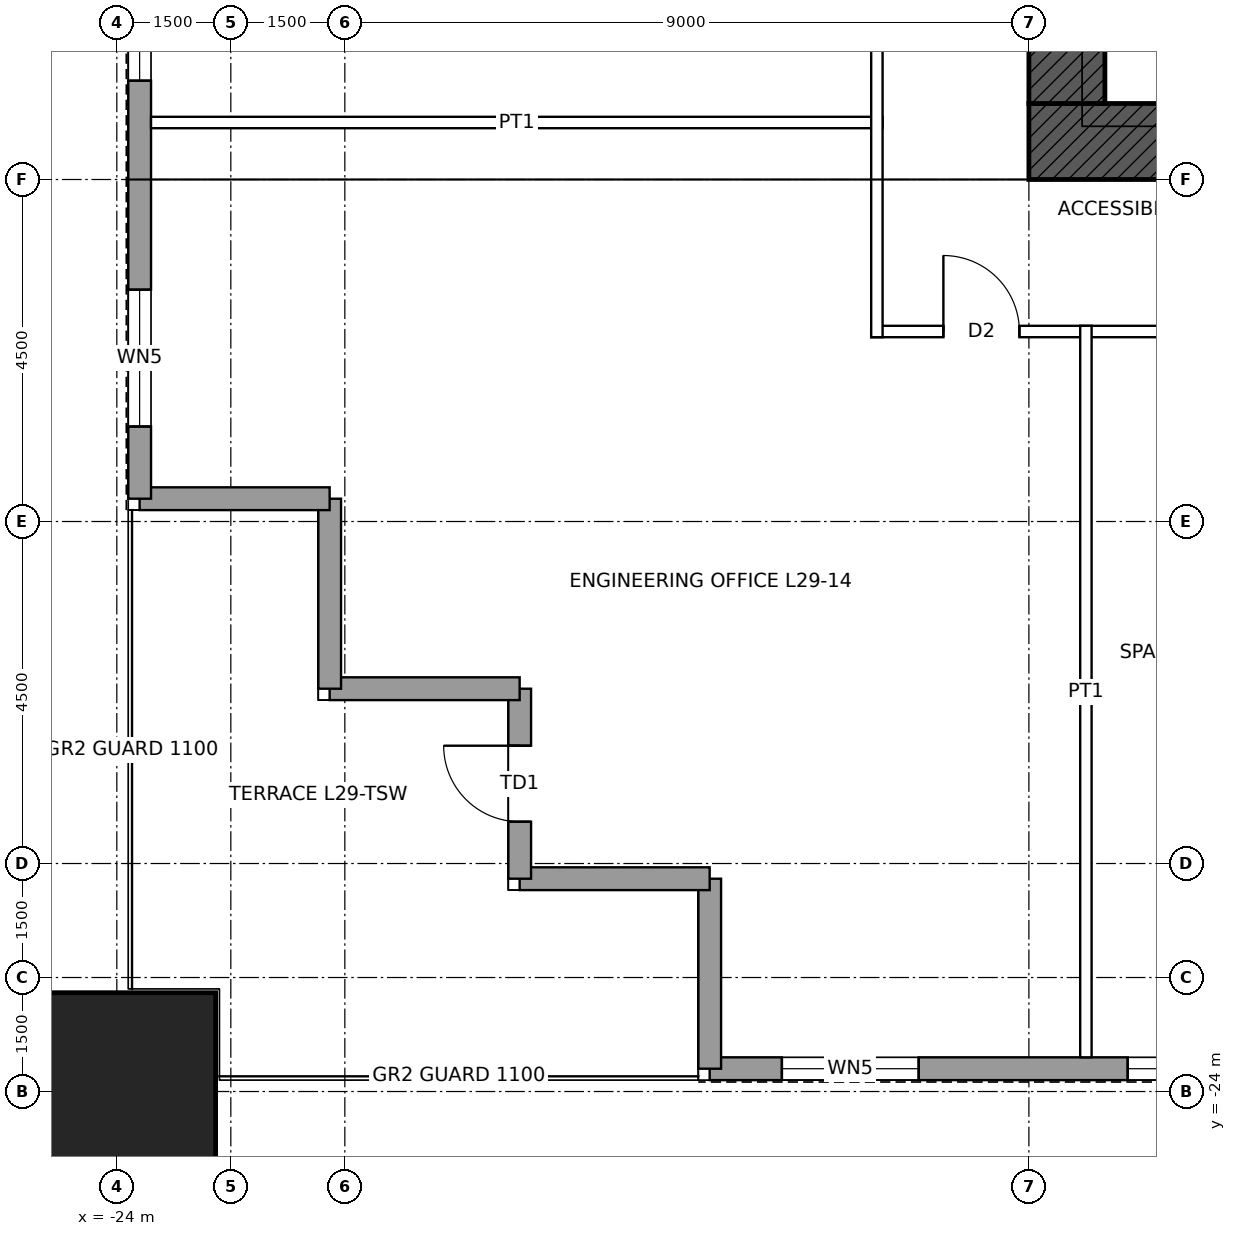
"""IFC4 building model, lengths in metres.
Left out: names, types, materials, properties, quantities, classifications, styles, units other than length and angle.
Written with IfcOpenShell. Run it as: python <this file> out.ifc"""

import sys

from ifc_helpers import new_model, si_unit, direction, frame, frame_2d, origin, origin_2d, place, context, subcontext, project, spatial, rectangle, hollow_rectangle, extrude, element, fill, save


model = new_model("IFC4")
c1 = context("Model", 3, precision=1e-05, world=origin(), true_north=direction((0.0, 1.0)))
c2 = subcontext(c1, "Body", "Model", "MODEL_VIEW")
j1 = project(units=[si_unit("LENGTHUNIT", "METRE"), si_unit("PLANEANGLEUNIT", "RADIAN")], contexts=[c1])
p1 = place(None, origin())
s1 = spatial("IfcSite", under=j1, at=p1, CompositionType="ELEMENT")
p2 = place(p1, origin())
s2 = spatial("IfcBuilding", under=s1, at=p2, CompositionType="ELEMENT")
p3 = place(p2, frame((0.0, 0.0, 144.9)))
s3 = spatial("IfcBuildingStorey", under=s2, at=p3, CompositionType="ELEMENT", Elevation=144.9)
p4 = place(p3, frame((-24.0, -24.0, 0.0), z_axis=(0.0, 0.0, 1.0), x_axis=(1.0, 0.0, 0.0)))
e1 = element("IfcColumn", 1, at=p4, inside=s3, PredefinedType="COLUMN", context=c2, shape_type="SweptSolid", body=[
    extrude(hollow_rectangle(XDim=2.6, YDim=2.6, WallThickness=0.13, at=origin_2d()), origin(), (0.0, 0.0, 1.0), 4.5),
])
p5 = place(p3, frame((12.0, -11.5, 0.0), z_axis=(0.0, 0.0, 1.0), x_axis=(-1.0, 0.0, 0.0)))
e2 = element("IfcWall", 2, at=p5, inside=s3, PredefinedType="SHEAR", context=c2, shape_type="SweptSolid", body=[
    extrude(rectangle(XDim=24.0, YDim=1.0, at=frame_2d((12.0, 0.0))), origin(), (0.0, 0.0, 1.0), 4.5),
])
p6 = place(p5, frame((11.5, 0.0, 0.0)))
e3 = element("IfcOpeningElement", 3, at=p6, cuts=e2, PredefinedType="OPENING", context=c2, shape_type="SweptSolid", body=[
    extrude(rectangle(XDim=1.0, YDim=2.1, at=frame_2d((0.5, 1.05))), frame((0.0, 0.51, 0.0), z_axis=(0.0, -1.0, 0.0), x_axis=(1.0, 0.0, 0.0)), (0.0, 0.0, 1.0), 1.02),
])
p7 = place(p5, frame((1.0, 0.0, 0.0)))
e4 = element("IfcOpeningElement", 4, at=p7, cuts=e2, PredefinedType="OPENING", context=c2, shape_type="SweptSolid", body=[
    extrude(rectangle(XDim=1.0, YDim=2.4, at=frame_2d((0.5, 1.2))), frame((0.0, 0.51, 0.0), z_axis=(0.0, -1.0, 0.0), x_axis=(1.0, 0.0, 0.0)), (0.0, 0.0, 1.0), 1.02),
])
p8 = place(p3, frame((-11.5, -11.0, 0.0), z_axis=(0.0, 0.0, 1.0), x_axis=(0.0, 1.0, 0.0)))
e5 = element("IfcWall", 5, at=p8, inside=s3, PredefinedType="SHEAR", context=c2, shape_type="SweptSolid", body=[
    extrude(rectangle(XDim=22.0, YDim=1.0, at=frame_2d((11.0, 0.0))), origin(), (0.0, 0.0, 1.0), 4.5),
])
p9 = place(p8, frame((10.5, 0.0, 0.0)))
e6 = element("IfcOpeningElement", 6, at=p9, cuts=e5, PredefinedType="OPENING", context=c2, shape_type="SweptSolid", body=[
    extrude(rectangle(XDim=1.0, YDim=2.4, at=frame_2d((0.5, 1.2))), frame((0.0, 0.51, 0.0), z_axis=(0.0, -1.0, 0.0), x_axis=(1.0, 0.0, 0.0)), (0.0, 0.0, 1.0), 1.02),
])
p10 = place(p3, frame((16.2, -23.7, 0.0), z_axis=(0.0, 0.0, 1.0), x_axis=(-1.0, 0.0, 0.0)))
e7 = element("IfcWall", 7, at=p10, inside=s3, PredefinedType="SOLIDWALL", context=c2, shape_type="SweptSolid", body=[
    extrude(rectangle(XDim=32.4, YDim=0.3, at=frame_2d((16.2, 0.0))), origin(), (0.0, 0.0, 1.0), 4.3),
])
p11 = place(p10, frame((0.95, 0.0, 1.0)))
e8 = element("IfcOpeningElement", 8, at=p11, cuts=e7, PredefinedType="OPENING", context=c2, shape_type="SweptSolid", body=[
    extrude(rectangle(XDim=1.8, YDim=1.2, at=frame_2d((0.9, 0.6))), frame((0.0, 0.16, 0.0), z_axis=(0.0, -1.0, 0.0), x_axis=(1.0, 0.0, 0.0)), (0.0, 0.0, 1.0), 0.32),
])
p12 = place(p10, frame((5.5, 0.0, 1.0)))
e9 = element("IfcOpeningElement", 9, at=p12, cuts=e7, PredefinedType="OPENING", context=c2, shape_type="SweptSolid", body=[
    extrude(rectangle(XDim=2.4, YDim=1.2, at=frame_2d((1.2, 0.6))), frame((0.0, 0.16, 0.0), z_axis=(0.0, -1.0, 0.0), x_axis=(1.0, 0.0, 0.0)), (0.0, 0.0, 1.0), 0.32),
])
p13 = place(p10, frame((9.5, 0.0, 1.0)))
e10 = element("IfcOpeningElement", 10, at=p13, cuts=e7, PredefinedType="OPENING", context=c2, shape_type="SweptSolid", body=[
    extrude(rectangle(XDim=2.4, YDim=1.2, at=frame_2d((1.2, 0.6))), frame((0.0, 0.16, 0.0), z_axis=(0.0, -1.0, 0.0), x_axis=(1.0, 0.0, 0.0)), (0.0, 0.0, 1.0), 0.32),
])
p14 = place(p10, frame((13.0, 0.0, 1.0)))
e11 = element("IfcOpeningElement", 11, at=p14, cuts=e7, PredefinedType="OPENING", context=c2, shape_type="SweptSolid", body=[
    extrude(rectangle(XDim=2.4, YDim=1.2, at=frame_2d((1.2, 0.6))), frame((0.0, 0.16, 0.0), z_axis=(0.0, -1.0, 0.0), x_axis=(1.0, 0.0, 0.0)), (0.0, 0.0, 1.0), 0.32),
])
p15 = place(p10, frame((17.0, 0.0, 1.0)))
e12 = element("IfcOpeningElement", 12, at=p15, cuts=e7, PredefinedType="OPENING", context=c2, shape_type="SweptSolid", body=[
    extrude(rectangle(XDim=2.4, YDim=1.2, at=frame_2d((1.2, 0.6))), frame((0.0, 0.16, 0.0), z_axis=(0.0, -1.0, 0.0), x_axis=(1.0, 0.0, 0.0)), (0.0, 0.0, 1.0), 0.32),
])
p16 = place(p10, frame((20.5, 0.0, 1.0)))
e13 = element("IfcOpeningElement", 13, at=p16, cuts=e7, PredefinedType="OPENING", context=c2, shape_type="SweptSolid", body=[
    extrude(rectangle(XDim=2.4, YDim=1.2, at=frame_2d((1.2, 0.6))), frame((0.0, 0.16, 0.0), z_axis=(0.0, -1.0, 0.0), x_axis=(1.0, 0.0, 0.0)), (0.0, 0.0, 1.0), 0.32),
])
p17 = place(p10, frame((24.5, 0.0, 1.0)))
e14 = element("IfcOpeningElement", 14, at=p17, cuts=e7, PredefinedType="OPENING", context=c2, shape_type="SweptSolid", body=[
    extrude(rectangle(XDim=2.4, YDim=1.2, at=frame_2d((1.2, 0.6))), frame((0.0, 0.16, 0.0), z_axis=(0.0, -1.0, 0.0), x_axis=(1.0, 0.0, 0.0)), (0.0, 0.0, 1.0), 0.32),
])
p18 = place(p10, frame((29.65, 0.0, 1.0)))
e15 = element("IfcOpeningElement", 15, at=p18, cuts=e7, PredefinedType="OPENING", context=c2, shape_type="SweptSolid", body=[
    extrude(rectangle(XDim=1.8, YDim=1.2, at=frame_2d((0.9, 0.6))), frame((0.0, 0.16, 0.0), z_axis=(0.0, -1.0, 0.0), x_axis=(1.0, 0.0, 0.0)), (0.0, 0.0, 1.0), 0.32),
])
for number, where, z_axis, x_axis in (
    (16, (-16.2, -23.7, 0.0), (0.0, 0.0, 1.0), (0.0, 1.0, 0.0)),
    (17, (-16.2, -21.2, 0.0), (0.0, 0.0, 1.0), (-1.0, 0.0, 0.0)),
):
    element("IfcWall", number, at=place(p3, frame(where, z_axis=z_axis, x_axis=x_axis)), inside=s3, PredefinedType="SOLIDWALL", context=c2, shape_type="SweptSolid", body=[
        extrude(rectangle(XDim=2.5, YDim=0.3, at=frame_2d((1.25, 0.0))), origin(), (0.0, 0.0, 1.0), 4.3),
    ])
p19 = place(p3, frame((-18.7, -21.2, 0.0), z_axis=(0.0, 0.0, 1.0), x_axis=(0.0, 1.0, 0.0)))
e18 = element("IfcWall", 18, at=p19, inside=s3, PredefinedType="SOLIDWALL", context=c2, shape_type="SweptSolid", body=[
    extrude(rectangle(XDim=2.5, YDim=0.3, at=frame_2d((1.25, 0.0))), origin(), (0.0, 0.0, 1.0), 4.3),
])
p20 = place(p19, frame((0.75, 0.0, 0.0)))
e19 = element("IfcOpeningElement", 19, at=p20, cuts=e18, PredefinedType="OPENING", context=c2, shape_type="SweptSolid", body=[
    extrude(rectangle(XDim=1.0, YDim=2.4, at=frame_2d((0.5, 1.2))), frame((0.0, 0.16, 0.0), z_axis=(0.0, -1.0, 0.0), x_axis=(1.0, 0.0, 0.0)), (0.0, 0.0, 1.0), 0.32),
])
for number, where, z_axis, x_axis in (
    (20, (-18.7, -18.7, 0.0), (0.0, 0.0, 1.0), (-1.0, 0.0, 0.0)),
    (21, (-21.2, -18.7, 0.0), (0.0, 0.0, 1.0), (0.0, 1.0, 0.0)),
    (22, (-21.2, -16.2, 0.0), (0.0, 0.0, 1.0), (-1.0, 0.0, 0.0)),
):
    element("IfcWall", number, at=place(p3, frame(where, z_axis=z_axis, x_axis=x_axis)), inside=s3, PredefinedType="SOLIDWALL", context=c2, shape_type="SweptSolid", body=[
        extrude(rectangle(XDim=2.5, YDim=0.3, at=frame_2d((1.25, 0.0))), origin(), (0.0, 0.0, 1.0), 4.3),
    ])
p21 = place(p3, frame((-23.7, -16.2, 0.0), z_axis=(0.0, 0.0, 1.0), x_axis=(0.0, 1.0, 0.0)))
e23 = element("IfcWall", 23, at=p21, inside=s3, PredefinedType="SOLIDWALL", context=c2, shape_type="SweptSolid", body=[
    extrude(rectangle(XDim=32.4, YDim=0.3, at=frame_2d((16.2, 0.0))), origin(), (0.0, 0.0, 1.0), 4.3),
])
p22 = place(p21, frame((0.95, 0.0, 1.0)))
e24 = element("IfcOpeningElement", 24, at=p22, cuts=e23, PredefinedType="OPENING", context=c2, shape_type="SweptSolid", body=[
    extrude(rectangle(XDim=1.8, YDim=1.2, at=frame_2d((0.9, 0.6))), frame((0.0, 0.16, 0.0), z_axis=(0.0, -1.0, 0.0), x_axis=(1.0, 0.0, 0.0)), (0.0, 0.0, 1.0), 0.32),
])
p23 = place(p21, frame((5.5, 0.0, 1.0)))
e25 = element("IfcOpeningElement", 25, at=p23, cuts=e23, PredefinedType="OPENING", context=c2, shape_type="SweptSolid", body=[
    extrude(rectangle(XDim=2.4, YDim=1.2, at=frame_2d((1.2, 0.6))), frame((0.0, 0.16, 0.0), z_axis=(0.0, -1.0, 0.0), x_axis=(1.0, 0.0, 0.0)), (0.0, 0.0, 1.0), 0.32),
])
p24 = place(p21, frame((9.5, 0.0, 1.0)))
e26 = element("IfcOpeningElement", 26, at=p24, cuts=e23, PredefinedType="OPENING", context=c2, shape_type="SweptSolid", body=[
    extrude(rectangle(XDim=2.4, YDim=1.2, at=frame_2d((1.2, 0.6))), frame((0.0, 0.16, 0.0), z_axis=(0.0, -1.0, 0.0), x_axis=(1.0, 0.0, 0.0)), (0.0, 0.0, 1.0), 0.32),
])
p25 = place(p21, frame((13.0, 0.0, 1.0)))
e27 = element("IfcOpeningElement", 27, at=p25, cuts=e23, PredefinedType="OPENING", context=c2, shape_type="SweptSolid", body=[
    extrude(rectangle(XDim=2.4, YDim=1.2, at=frame_2d((1.2, 0.6))), frame((0.0, 0.16, 0.0), z_axis=(0.0, -1.0, 0.0), x_axis=(1.0, 0.0, 0.0)), (0.0, 0.0, 1.0), 0.32),
])
p26 = place(p21, frame((17.0, 0.0, 1.0)))
e28 = element("IfcOpeningElement", 28, at=p26, cuts=e23, PredefinedType="OPENING", context=c2, shape_type="SweptSolid", body=[
    extrude(rectangle(XDim=2.4, YDim=1.2, at=frame_2d((1.2, 0.6))), frame((0.0, 0.16, 0.0), z_axis=(0.0, -1.0, 0.0), x_axis=(1.0, 0.0, 0.0)), (0.0, 0.0, 1.0), 0.32),
])
p27 = place(p21, frame((20.5, 0.0, 1.0)))
e29 = element("IfcOpeningElement", 29, at=p27, cuts=e23, PredefinedType="OPENING", context=c2, shape_type="SweptSolid", body=[
    extrude(rectangle(XDim=2.4, YDim=1.2, at=frame_2d((1.2, 0.6))), frame((0.0, 0.16, 0.0), z_axis=(0.0, -1.0, 0.0), x_axis=(1.0, 0.0, 0.0)), (0.0, 0.0, 1.0), 0.32),
])
p28 = place(p21, frame((24.5, 0.0, 1.0)))
e30 = element("IfcOpeningElement", 30, at=p28, cuts=e23, PredefinedType="OPENING", context=c2, shape_type="SweptSolid", body=[
    extrude(rectangle(XDim=2.4, YDim=1.2, at=frame_2d((1.2, 0.6))), frame((0.0, 0.16, 0.0), z_axis=(0.0, -1.0, 0.0), x_axis=(1.0, 0.0, 0.0)), (0.0, 0.0, 1.0), 0.32),
])
p29 = place(p21, frame((29.65, 0.0, 1.0)))
e31 = element("IfcOpeningElement", 31, at=p29, cuts=e23, PredefinedType="OPENING", context=c2, shape_type="SweptSolid", body=[
    extrude(rectangle(XDim=1.8, YDim=1.2, at=frame_2d((0.9, 0.6))), frame((0.0, 0.16, 0.0), z_axis=(0.0, -1.0, 0.0), x_axis=(1.0, 0.0, 0.0)), (0.0, 0.0, 1.0), 0.32),
])
p30 = place(p3, frame((-14.075, -14.0, 0.0), z_axis=(0.0, 0.0, 1.0), x_axis=(1.0, 0.0, 0.0)))
e32 = element("IfcWall", 32, at=p30, inside=s3, PredefinedType="PARTITIONING", context=c2, shape_type="SweptSolid", body=[
    extrude(rectangle(XDim=28.15, YDim=0.15, at=frame_2d((14.075, 0.0))), origin(), (0.0, 0.0, 1.0), 4.3),
])
p31 = place(p30, frame((18.8, 0.0, 0.0)))
e33 = element("IfcOpeningElement", 33, at=p31, cuts=e32, PredefinedType="OPENING", context=c2, shape_type="SweptSolid", body=[
    extrude(rectangle(XDim=1.8, YDim=2.4, at=frame_2d((0.9, 1.2))), frame((0.0, 0.085, 0.0), z_axis=(0.0, -1.0, 0.0), x_axis=(1.0, 0.0, 0.0)), (0.0, 0.0, 1.0), 0.17),
])
p32 = place(p30, frame((9.425, 0.0, 0.0)))
e34 = element("IfcOpeningElement", 34, at=p32, cuts=e32, PredefinedType="OPENING", context=c2, shape_type="SweptSolid", body=[
    extrude(rectangle(XDim=1.8, YDim=2.4, at=frame_2d((0.9, 1.2))), frame((0.0, 0.085, 0.0), z_axis=(0.0, -1.0, 0.0), x_axis=(1.0, 0.0, 0.0)), (0.0, 0.0, 1.0), 0.17),
])
p33 = place(p30, frame((4.2, 0.0, 0.0)))
e35 = element("IfcOpeningElement", 35, at=p33, cuts=e32, PredefinedType="OPENING", context=c2, shape_type="SweptSolid", body=[
    extrude(rectangle(XDim=1.0, YDim=2.1, at=frame_2d((0.5, 1.05))), frame((0.0, 0.085, 0.0), z_axis=(0.0, -1.0, 0.0), x_axis=(1.0, 0.0, 0.0)), (0.0, 0.0, 1.0), 0.17),
])
p34 = place(p30, frame((26.2, 0.0, 0.0)))
e36 = element("IfcOpeningElement", 36, at=p34, cuts=e32, PredefinedType="OPENING", context=c2, shape_type="SweptSolid", body=[
    extrude(rectangle(XDim=1.0, YDim=2.1, at=frame_2d((0.5, 1.05))), frame((0.0, 0.085, 0.0), z_axis=(0.0, -1.0, 0.0), x_axis=(1.0, 0.0, 0.0)), (0.0, 0.0, 1.0), 0.17),
])
p35 = place(p30, frame((0.95, 0.0, 0.0)))
e37 = element("IfcOpeningElement", 37, at=p35, cuts=e32, PredefinedType="OPENING", context=c2, shape_type="SweptSolid", body=[
    extrude(rectangle(XDim=1.0, YDim=2.1, at=frame_2d((0.5, 1.05))), frame((0.0, 0.085, 0.0), z_axis=(0.0, -1.0, 0.0), x_axis=(1.0, 0.0, 0.0)), (0.0, 0.0, 1.0), 0.17),
])
p36 = place(p3, frame((-23.55, -11.25, 0.0), z_axis=(0.0, 0.0, 1.0), x_axis=(1.0, 0.0, 0.0)))
e38 = element("IfcWall", 38, at=p36, inside=s3, PredefinedType="PARTITIONING", context=c2, shape_type="SweptSolid", body=[
    extrude(rectangle(XDim=9.625, YDim=0.15, at=frame_2d((4.812, 0.0))), origin(), (0.0, 0.0, 1.0), 3.431),
])
p37 = place(p3, frame((-14.0, -14.075, 0.0), z_axis=(0.0, 0.0, 1.0), x_axis=(0.0, 1.0, 0.0)))
e39 = element("IfcWall", 39, at=p37, inside=s3, PredefinedType="PARTITIONING", context=c2, shape_type="SweptSolid", body=[
    extrude(rectangle(XDim=26.15, YDim=0.15, at=frame_2d((13.075, 0.0))), origin(), (0.0, 0.0, 1.0), 4.3),
])
p38 = place(p37, frame((5.675, 0.0, 0.0)))
e40 = element("IfcOpeningElement", 40, at=p38, cuts=e39, PredefinedType="OPENING", context=c2, shape_type="SweptSolid", body=[
    extrude(rectangle(XDim=1.8, YDim=2.4, at=frame_2d((0.9, 1.2))), frame((0.0, 0.085, 0.0), z_axis=(0.0, -1.0, 0.0), x_axis=(1.0, 0.0, 0.0)), (0.0, 0.0, 1.0), 0.17),
])
p39 = place(p37, frame((13.175, 0.0, 0.0)))
e41 = element("IfcOpeningElement", 41, at=p39, cuts=e39, PredefinedType="OPENING", context=c2, shape_type="SweptSolid", body=[
    extrude(rectangle(XDim=1.8, YDim=2.4, at=frame_2d((0.9, 1.2))), frame((0.0, 0.085, 0.0), z_axis=(0.0, -1.0, 0.0), x_axis=(1.0, 0.0, 0.0)), (0.0, 0.0, 1.0), 0.17),
])
p40 = place(p37, frame((20.675, 0.0, 0.0)))
e42 = element("IfcOpeningElement", 42, at=p40, cuts=e39, PredefinedType="OPENING", context=c2, shape_type="SweptSolid", body=[
    extrude(rectangle(XDim=1.8, YDim=2.4, at=frame_2d((0.9, 1.2))), frame((0.0, 0.085, 0.0), z_axis=(0.0, -1.0, 0.0), x_axis=(1.0, 0.0, 0.0)), (0.0, 0.0, 1.0), 0.17),
])
p41 = place(p3, frame((-11.25, -23.55, 0.0), z_axis=(0.0, 0.0, 1.0), x_axis=(0.0, 1.0, 0.0)))
e43 = element("IfcWall", 43, at=p41, inside=s3, PredefinedType="PARTITIONING", context=c2, shape_type="SweptSolid", body=[
    extrude(rectangle(XDim=9.625, YDim=0.15, at=frame_2d((4.812, 0.0))), origin(), (0.0, 0.0, 1.0), 3.431),
])
p42 = place(p17, origin())
e44 = element("IfcWindow", 44, at=p42, inside=s3, PartitioningType="SINGLE_PANEL", PredefinedType="WINDOW", context=c2, shape_type="SweptSolid", body=[
    extrude(rectangle(XDim=2.4, YDim=1.2, at=frame_2d((1.2, 0.6))), frame((0.0, 0.03, 0.0), z_axis=(0.0, -1.0, 0.0), x_axis=(1.0, 0.0, 0.0)), (0.0, 0.0, 1.0), 0.06),
])
fill(e14, e44)
p43 = place(p18, origin())
e45 = element("IfcWindow", 45, at=p43, inside=s3, PartitioningType="SINGLE_PANEL", PredefinedType="WINDOW", context=c2, shape_type="SweptSolid", body=[
    extrude(rectangle(XDim=1.8, YDim=1.2, at=frame_2d((0.9, 0.6))), frame((0.0, 0.03, 0.0), z_axis=(0.0, -1.0, 0.0), x_axis=(1.0, 0.0, 0.0)), (0.0, 0.0, 1.0), 0.06),
])
fill(e15, e45)
p44 = place(p20, origin())
e46 = element("IfcDoor", 46, at=p44, inside=s3, OperationType="SINGLE_SWING_RIGHT", PredefinedType="DOOR", context=c2, shape_type="SweptSolid", body=[
    extrude(rectangle(XDim=1.0, YDim=2.4, at=frame_2d((0.5, 1.2))), frame((0.0, 0.025, 0.0), z_axis=(0.0, -1.0, 0.0), x_axis=(1.0, 0.0, 0.0)), (0.0, 0.0, 1.0), 0.05),
])
fill(e19, e46)
p45 = place(p22, origin())
e47 = element("IfcWindow", 47, at=p45, inside=s3, PartitioningType="SINGLE_PANEL", PredefinedType="WINDOW", context=c2, shape_type="SweptSolid", body=[
    extrude(rectangle(XDim=1.8, YDim=1.2, at=frame_2d((0.9, 0.6))), frame((0.0, 0.03, 0.0), z_axis=(0.0, -1.0, 0.0), x_axis=(1.0, 0.0, 0.0)), (0.0, 0.0, 1.0), 0.06),
])
fill(e24, e47)
p46 = place(p23, origin())
e48 = element("IfcWindow", 48, at=p46, inside=s3, PartitioningType="SINGLE_PANEL", PredefinedType="WINDOW", context=c2, shape_type="SweptSolid", body=[
    extrude(rectangle(XDim=2.4, YDim=1.2, at=frame_2d((1.2, 0.6))), frame((0.0, 0.03, 0.0), z_axis=(0.0, -1.0, 0.0), x_axis=(1.0, 0.0, 0.0)), (0.0, 0.0, 1.0), 0.06),
])
fill(e25, e48)
p47 = place(p35, origin())
e49 = element("IfcDoor", 49, at=p47, inside=s3, OperationType="SINGLE_SWING_LEFT", PredefinedType="DOOR", context=c2, shape_type="SweptSolid", body=[
    extrude(rectangle(XDim=1.0, YDim=2.1, at=frame_2d((0.5, 1.05))), frame((0.0, 0.025, 0.0), z_axis=(0.0, -1.0, 0.0), x_axis=(1.0, 0.0, 0.0)), (0.0, 0.0, 1.0), 0.05),
])
fill(e37, e49)
save(model, sys.argv[1])
